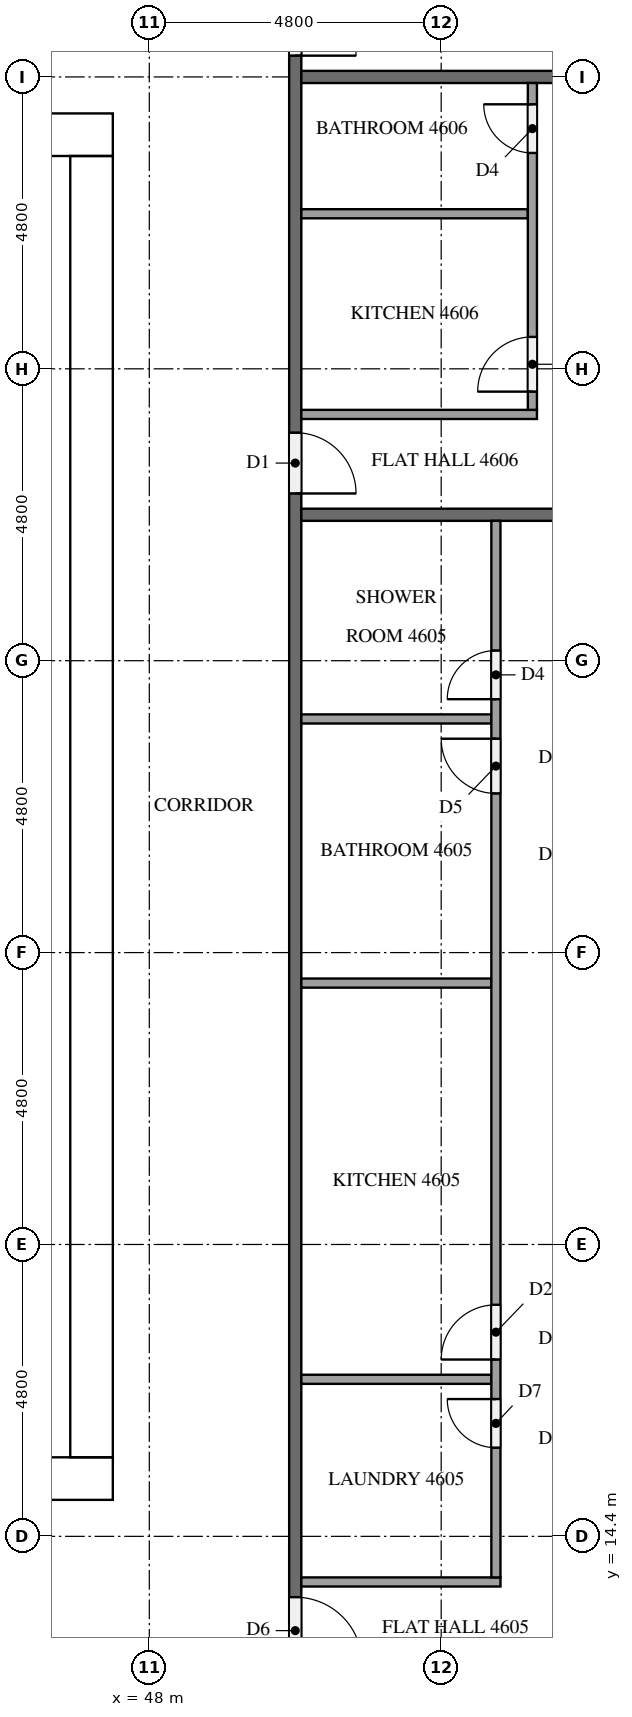
"""IFC4 building model, lengths in metres.
Left out: names, types, materials, properties, quantities, classifications, styles, units other than length and angle.
Written with IfcOpenShell. Run it as: python <this file> out.ifc"""

import sys

from ifc_helpers import new_model, si_unit, direction, frame, frame_2d, origin, place, context, subcontext, project, spatial, rectangle, extrude, element, fill, save


model = new_model("IFC4")
c1 = context("Model", 3, precision=1e-05, world=origin(), true_north=direction((0.0, 1.0)))
c2 = subcontext(c1, "Body", "Model", "MODEL_VIEW")
j1 = project(units=[si_unit("LENGTHUNIT", "METRE"), si_unit("PLANEANGLEUNIT", "RADIAN")], contexts=[c1])
p1 = place(None, origin())
s1 = spatial("IfcSite", under=j1, at=p1, CompositionType="ELEMENT")
p2 = place(p1, origin())
s2 = spatial("IfcBuilding", under=s1, at=p2, CompositionType="ELEMENT")
p3 = place(p2, frame((0.0, 0.0, 178.9)))
s3 = spatial("IfcBuildingStorey", under=s2, at=p3, CompositionType="ELEMENT", Elevation=178.9)
p4 = place(p3, frame((15.0, 15.35, 0.0), z_axis=(0.0, 0.0, 1.0), x_axis=(1.0, 0.0, 0.0)))
e1 = element("IfcWall", 1, at=p4, inside=s3, PredefinedType="SHEAR", context=c2, shape_type="SweptSolid", body=[
    extrude(rectangle(XDim=32.4, YDim=0.7, at=frame_2d((16.2, 0.0))), origin(), (0.0, 0.0, 1.0), 3.2),
])
p5 = place(p4, frame((15.3, 0.0, 0.0)))
e2 = element("IfcOpeningElement", 2, at=p5, cuts=e1, PredefinedType="OPENING", context=c2, shape_type="SweptSolid", body=[
    extrude(rectangle(XDim=1.8, YDim=2.1, at=frame_2d((0.9, 1.05))), frame((0.0, 0.36, 0.0), z_axis=(0.0, -1.0, 0.0), x_axis=(1.0, 0.0, 0.0)), (0.0, 0.0, 1.0), 0.72),
])
p6 = place(p3, frame((15.0, 37.45, 0.0), z_axis=(0.0, 0.0, 1.0), x_axis=(1.0, 0.0, 0.0)))
e3 = element("IfcWall", 3, at=p6, inside=s3, PredefinedType="SHEAR", context=c2, shape_type="SweptSolid", body=[
    extrude(rectangle(XDim=32.4, YDim=0.7, at=frame_2d((16.2, 0.0))), origin(), (0.0, 0.0, 1.0), 3.2),
])
p7 = place(p6, frame((15.3, 0.0, 0.0)))
e4 = element("IfcOpeningElement", 4, at=p7, cuts=e3, PredefinedType="OPENING", context=c2, shape_type="SweptSolid", body=[
    extrude(rectangle(XDim=1.8, YDim=2.1, at=frame_2d((0.9, 1.05))), frame((0.0, 0.36, 0.0), z_axis=(0.0, -1.0, 0.0), x_axis=(1.0, 0.0, 0.0)), (0.0, 0.0, 1.0), 0.72),
])
p8 = place(p6, frame((1.544, 0.0, 0.0)))
e5 = element("IfcOpeningElement", 5, at=p8, cuts=e3, PredefinedType="OPENING", context=c2, shape_type="SweptSolid", body=[
    extrude(rectangle(XDim=1.0, YDim=2.1, at=frame_2d((0.5, 1.05))), frame((0.0, 0.36, 0.0), z_axis=(0.0, -1.0, 0.0), x_axis=(1.0, 0.0, 0.0)), (0.0, 0.0, 1.0), 0.72),
])
p9 = place(p6, frame((5.219, 0.0, 0.0)))
e6 = element("IfcOpeningElement", 6, at=p9, cuts=e3, PredefinedType="OPENING", context=c2, shape_type="SweptSolid", body=[
    extrude(rectangle(XDim=1.0, YDim=2.1, at=frame_2d((0.5, 1.05))), frame((0.0, 0.36, 0.0), z_axis=(0.0, -1.0, 0.0), x_axis=(1.0, 0.0, 0.0)), (0.0, 0.0, 1.0), 0.72),
])
p10 = place(p3, frame((47.05, 15.7, 0.0), z_axis=(0.0, 0.0, 1.0), x_axis=(0.0, 1.0, 0.0)))
e7 = element("IfcWall", 7, at=p10, inside=s3, PredefinedType="SHEAR", context=c2, shape_type="SweptSolid", body=[
    extrude(rectangle(XDim=21.4, YDim=0.7, at=frame_2d((10.7, 0.0))), origin(), (0.0, 0.0, 1.0), 3.2),
])
p11 = place(p10, frame((10.4, 0.0, 0.0)))
e8 = element("IfcOpeningElement", 8, at=p11, cuts=e7, PredefinedType="OPENING", context=c2, shape_type="SweptSolid", body=[
    extrude(rectangle(XDim=1.2, YDim=2.1, at=frame_2d((0.6, 1.05))), frame((0.0, 0.36, 0.0), z_axis=(0.0, -1.0, 0.0), x_axis=(1.0, 0.0, 0.0)), (0.0, 0.0, 1.0), 0.72),
])
p12 = place(p3, frame((50.4, 40.7, 0.0), z_axis=(0.0, 0.0, 1.0), x_axis=(0.0, -1.0, 0.0)))
e9 = element("IfcWall", 9, at=p12, inside=s3, PredefinedType="PARTITIONING", context=c2, shape_type="SweptSolid", body=[
    extrude(rectangle(XDim=28.6, YDim=0.2, at=frame_2d((14.3, 0.0))), origin(), (0.0, 0.0, 1.0), 3.2),
])
p13 = place(p12, frame((27.3, 0.0, 0.0)))
e10 = element("IfcOpeningElement", 10, at=p13, cuts=e9, PredefinedType="OPENING", context=c2, shape_type="SweptSolid", body=[
    extrude(rectangle(XDim=1.1, YDim=2.1, at=frame_2d((0.55, 1.05))), frame((0.0, 0.11, 0.0), z_axis=(0.0, -1.0, 0.0), x_axis=(1.0, 0.0, 0.0)), (0.0, 0.0, 1.0), 0.22),
])
p14 = place(p12, frame((8.15, 0.0, 0.0)))
e11 = element("IfcOpeningElement", 11, at=p14, cuts=e9, PredefinedType="OPENING", context=c2, shape_type="SweptSolid", body=[
    extrude(rectangle(XDim=1.0, YDim=2.1, at=frame_2d((0.5, 1.05))), frame((0.0, 0.11, 0.0), z_axis=(0.0, -1.0, 0.0), x_axis=(1.0, 0.0, 0.0)), (0.0, 0.0, 1.0), 0.22),
])
p15 = place(p12, frame((0.95, 0.0, 0.0)))
e12 = element("IfcOpeningElement", 12, at=p15, cuts=e9, PredefinedType="OPENING", context=c2, shape_type="SweptSolid", body=[
    extrude(rectangle(XDim=1.0, YDim=2.1, at=frame_2d((0.5, 1.05))), frame((0.0, 0.11, 0.0), z_axis=(0.0, -1.0, 0.0), x_axis=(1.0, 0.0, 0.0)), (0.0, 0.0, 1.0), 0.22),
])
for number, where, z_axis, x_axis in (
    (13, (50.5, 31.2, 0.0), (0.0, 0.0, 1.0), (1.0, 0.0, 0.0)),
    (14, (50.5, 38.4, 0.0), (0.0, 0.0, 1.0), (1.0, 0.0, 0.0)),
):
    element("IfcWall", number, at=place(p3, frame(where, z_axis=z_axis, x_axis=x_axis)), inside=s3, PredefinedType="PARTITIONING", context=c2, shape_type="SweptSolid", body=[
        extrude(rectangle(XDim=11.8, YDim=0.2, at=frame_2d((5.9, 0.0))), origin(), (0.0, 0.0, 1.0), 3.2),
    ])
for number, where, z_axis, x_axis in (
    (15, (50.5, 16.983, 0.0), (0.0, 0.0, 1.0), (1.0, 0.0, 0.0)),
    (16, (50.5, 23.498, 0.0), (0.0, 0.0, 1.0), (1.0, 0.0, 0.0)),
    (17, (50.5, 27.842, 0.0), (0.0, 0.0, 1.0), (1.0, 0.0, 0.0)),
):
    element("IfcWall", number, at=place(p3, frame(where, z_axis=z_axis, x_axis=x_axis)), inside=s3, PredefinedType="PARTITIONING", context=c2, shape_type="SweptSolid", body=[
        extrude(rectangle(XDim=3.125, YDim=0.15, at=frame_2d((1.562, 0.0))), origin(), (0.0, 0.0, 1.0), 3.2),
    ])
p16 = place(p3, frame((50.5, 13.65, 0.0), z_axis=(0.0, 0.0, 1.0), x_axis=(1.0, 0.0, 0.0)))
e18 = element("IfcWall", 18, at=p16, inside=s3, PredefinedType="PARTITIONING", context=c2, shape_type="SweptSolid", body=[
    extrude(rectangle(XDim=3.275, YDim=0.15, at=frame_2d((1.637, 0.0))), origin(), (0.0, 0.0, 1.0), 3.2),
])
p17 = place(p3, frame((53.7, 13.725, 0.0), z_axis=(0.0, 0.0, 1.0), x_axis=(0.0, 1.0, 0.0)))
e19 = element("IfcWall", 19, at=p17, inside=s3, PredefinedType="PARTITIONING", context=c2, shape_type="SweptSolid", body=[
    extrude(rectangle(XDim=17.375, YDim=0.15, at=frame_2d((8.688, 0.0))), origin(), (0.0, 0.0, 1.0), 3.2),
])
p18 = place(p17, frame((2.133, 0.0, 0.0)))
e20 = element("IfcOpeningElement", 20, at=p18, cuts=e19, PredefinedType="OPENING", context=c2, shape_type="SweptSolid", body=[
    extrude(rectangle(XDim=0.8, YDim=2.1, at=frame_2d((0.4, 1.05))), frame((0.0, 0.085, 0.0), z_axis=(0.0, -1.0, 0.0), x_axis=(1.0, 0.0, 0.0)), (0.0, 0.0, 1.0), 0.17),
])
p19 = place(p17, frame((3.583, 0.0, 0.0)))
e21 = element("IfcOpeningElement", 21, at=p19, cuts=e19, PredefinedType="OPENING", context=c2, shape_type="SweptSolid", body=[
    extrude(rectangle(XDim=0.9, YDim=2.1, at=frame_2d((0.45, 1.05))), frame((0.0, 0.085, 0.0), z_axis=(0.0, -1.0, 0.0), x_axis=(1.0, 0.0, 0.0)), (0.0, 0.0, 1.0), 0.17),
])
p20 = place(p17, frame((12.892, 0.0, 0.0)))
e22 = element("IfcOpeningElement", 22, at=p20, cuts=e19, PredefinedType="OPENING", context=c2, shape_type="SweptSolid", body=[
    extrude(rectangle(XDim=0.9, YDim=2.1, at=frame_2d((0.45, 1.05))), frame((0.0, 0.085, 0.0), z_axis=(0.0, -1.0, 0.0), x_axis=(1.0, 0.0, 0.0)), (0.0, 0.0, 1.0), 0.17),
])
p21 = place(p17, frame((14.442, 0.0, 0.0)))
e23 = element("IfcOpeningElement", 23, at=p21, cuts=e19, PredefinedType="OPENING", context=c2, shape_type="SweptSolid", body=[
    extrude(rectangle(XDim=0.8, YDim=2.1, at=frame_2d((0.4, 1.05))), frame((0.0, 0.085, 0.0), z_axis=(0.0, -1.0, 0.0), x_axis=(1.0, 0.0, 0.0)), (0.0, 0.0, 1.0), 0.17),
])
p22 = place(p3, frame((50.5, 36.15, 0.0), z_axis=(0.0, 0.0, 1.0), x_axis=(1.0, 0.0, 0.0)))
e24 = element("IfcWall", 24, at=p22, inside=s3, PredefinedType="PARTITIONING", context=c2, shape_type="SweptSolid", body=[
    extrude(rectangle(XDim=3.725, YDim=0.15, at=frame_2d((1.863, 0.0))), origin(), (0.0, 0.0, 1.0), 3.2),
])
p23 = place(p3, frame((50.5, 32.85, 0.0), z_axis=(0.0, 0.0, 1.0), x_axis=(1.0, 0.0, 0.0)))
e25 = element("IfcWall", 25, at=p23, inside=s3, PredefinedType="PARTITIONING", context=c2, shape_type="SweptSolid", body=[
    extrude(rectangle(XDim=3.875, YDim=0.15, at=frame_2d((1.938, 0.0))), origin(), (0.0, 0.0, 1.0), 3.2),
])
p24 = place(p3, frame((54.3, 32.925, 0.0), z_axis=(0.0, 0.0, 1.0), x_axis=(0.0, 1.0, 0.0)))
e26 = element("IfcWall", 26, at=p24, inside=s3, PredefinedType="PARTITIONING", context=c2, shape_type="SweptSolid", body=[
    extrude(rectangle(XDim=5.375, YDim=0.15, at=frame_2d((2.688, 0.0))), origin(), (0.0, 0.0, 1.0), 3.2),
])
p25 = place(p24, frame((0.3, 0.0, 0.0)))
e27 = element("IfcOpeningElement", 27, at=p25, cuts=e26, PredefinedType="OPENING", context=c2, shape_type="SweptSolid", body=[
    extrude(rectangle(XDim=0.9, YDim=2.1, at=frame_2d((0.45, 1.05))), frame((0.0, 0.085, 0.0), z_axis=(0.0, -1.0, 0.0), x_axis=(1.0, 0.0, 0.0)), (0.0, 0.0, 1.0), 0.17),
])
p26 = place(p24, frame((4.225, 0.0, 0.0)))
e28 = element("IfcOpeningElement", 28, at=p26, cuts=e26, PredefinedType="OPENING", context=c2, shape_type="SweptSolid", body=[
    extrude(rectangle(XDim=0.8, YDim=2.1, at=frame_2d((0.4, 1.05))), frame((0.0, 0.085, 0.0), z_axis=(0.0, -1.0, 0.0), x_axis=(1.0, 0.0, 0.0)), (0.0, 0.0, 1.0), 0.17),
])
p27 = place(p11, origin())
e29 = element("IfcDoor", 29, at=p27, inside=s3, OperationType="SINGLE_SWING_RIGHT", PredefinedType="DOOR", context=c2, shape_type="SweptSolid", body=[
    extrude(rectangle(XDim=1.2, YDim=2.1, at=frame_2d((0.6, 1.05))), frame((0.0, 0.025, 0.0), z_axis=(0.0, -1.0, 0.0), x_axis=(1.0, 0.0, 0.0)), (0.0, 0.0, 1.0), 0.05),
])
fill(e8, e29)
p28 = place(p13, origin())
e30 = element("IfcDoor", 30, at=p28, inside=s3, OperationType="SINGLE_SWING_RIGHT", PredefinedType="DOOR", context=c2, shape_type="SweptSolid", body=[
    extrude(rectangle(XDim=1.1, YDim=2.1, at=frame_2d((0.55, 1.05))), frame((0.0, 0.025, 0.0), z_axis=(0.0, -1.0, 0.0), x_axis=(1.0, 0.0, 0.0)), (0.0, 0.0, 1.0), 0.05),
])
fill(e10, e30)
p29 = place(p14, origin())
e31 = element("IfcDoor", 31, at=p29, inside=s3, OperationType="SINGLE_SWING_RIGHT", PredefinedType="DOOR", context=c2, shape_type="SweptSolid", body=[
    extrude(rectangle(XDim=1.0, YDim=2.1, at=frame_2d((0.5, 1.05))), frame((0.0, 0.025, 0.0), z_axis=(0.0, -1.0, 0.0), x_axis=(1.0, 0.0, 0.0)), (0.0, 0.0, 1.0), 0.05),
])
fill(e11, e31)
p30 = place(p15, origin())
e32 = element("IfcDoor", 32, at=p30, inside=s3, OperationType="SINGLE_SWING_RIGHT", PredefinedType="DOOR", context=c2, shape_type="SweptSolid", body=[
    extrude(rectangle(XDim=1.0, YDim=2.1, at=frame_2d((0.5, 1.05))), frame((0.0, 0.025, 0.0), z_axis=(0.0, -1.0, 0.0), x_axis=(1.0, 0.0, 0.0)), (0.0, 0.0, 1.0), 0.05),
])
fill(e12, e32)
p31 = place(p18, origin())
e33 = element("IfcDoor", 33, at=p31, inside=s3, OperationType="SINGLE_SWING_RIGHT", PredefinedType="DOOR", context=c2, shape_type="SweptSolid", body=[
    extrude(rectangle(XDim=0.8, YDim=2.1, at=frame_2d((0.4, 1.05))), frame((0.0, 0.025, 0.0), z_axis=(0.0, -1.0, 0.0), x_axis=(1.0, 0.0, 0.0)), (0.0, 0.0, 1.0), 0.05),
])
fill(e20, e33)
p32 = place(p19, origin())
e34 = element("IfcDoor", 34, at=p32, inside=s3, OperationType="SINGLE_SWING_LEFT", PredefinedType="DOOR", context=c2, shape_type="SweptSolid", body=[
    extrude(rectangle(XDim=0.9, YDim=2.1, at=frame_2d((0.45, 1.05))), frame((0.0, 0.025, 0.0), z_axis=(0.0, -1.0, 0.0), x_axis=(1.0, 0.0, 0.0)), (0.0, 0.0, 1.0), 0.05),
])
fill(e21, e34)
p33 = place(p20, origin())
e35 = element("IfcDoor", 35, at=p33, inside=s3, OperationType="SINGLE_SWING_RIGHT", PredefinedType="DOOR", context=c2, shape_type="SweptSolid", body=[
    extrude(rectangle(XDim=0.9, YDim=2.1, at=frame_2d((0.45, 1.05))), frame((0.0, 0.025, 0.0), z_axis=(0.0, -1.0, 0.0), x_axis=(1.0, 0.0, 0.0)), (0.0, 0.0, 1.0), 0.05),
])
fill(e22, e35)
p34 = place(p21, origin())
e36 = element("IfcDoor", 36, at=p34, inside=s3, OperationType="SINGLE_SWING_LEFT", PredefinedType="DOOR", context=c2, shape_type="SweptSolid", body=[
    extrude(rectangle(XDim=0.8, YDim=2.1, at=frame_2d((0.4, 1.05))), frame((0.0, 0.025, 0.0), z_axis=(0.0, -1.0, 0.0), x_axis=(1.0, 0.0, 0.0)), (0.0, 0.0, 1.0), 0.05),
])
fill(e23, e36)
p35 = place(p25, origin())
e37 = element("IfcDoor", 37, at=p35, inside=s3, OperationType="SINGLE_SWING_LEFT", PredefinedType="DOOR", context=c2, shape_type="SweptSolid", body=[
    extrude(rectangle(XDim=0.9, YDim=2.1, at=frame_2d((0.45, 1.05))), frame((0.0, 0.025, 0.0), z_axis=(0.0, -1.0, 0.0), x_axis=(1.0, 0.0, 0.0)), (0.0, 0.0, 1.0), 0.05),
])
fill(e27, e37)
p36 = place(p26, origin())
e38 = element("IfcDoor", 38, at=p36, inside=s3, OperationType="SINGLE_SWING_RIGHT", PredefinedType="DOOR", context=c2, shape_type="SweptSolid", body=[
    extrude(rectangle(XDim=0.8, YDim=2.1, at=frame_2d((0.4, 1.05))), frame((0.0, 0.025, 0.0), z_axis=(0.0, -1.0, 0.0), x_axis=(1.0, 0.0, 0.0)), (0.0, 0.0, 1.0), 0.05),
])
fill(e28, e38)
save(model, sys.argv[1])
